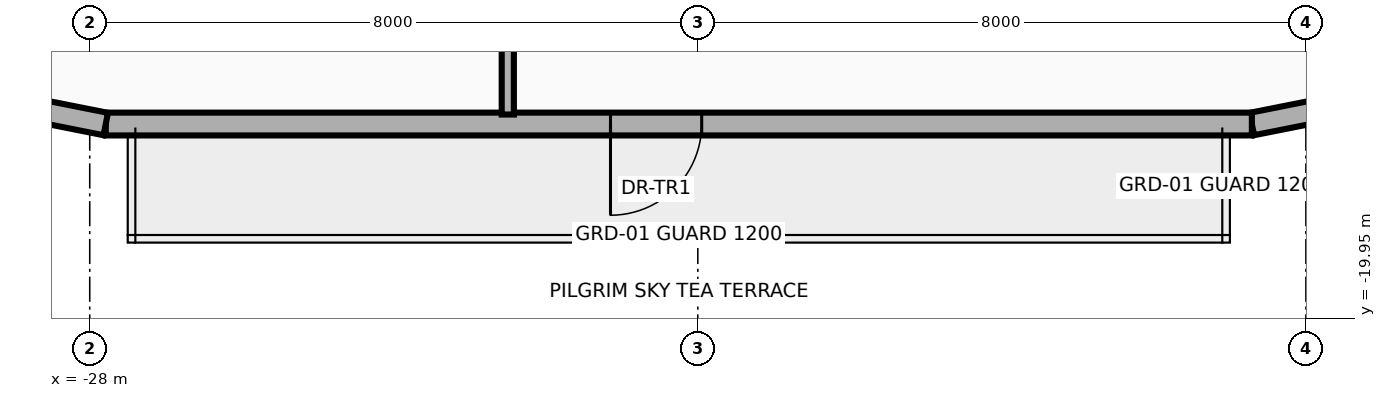
"""IFC4 building model, lengths in metres.
Left out: names, types, materials, properties, quantities, classifications, styles, units other than length and angle.
Written with IfcOpenShell. Run it as: python <this file> out.ifc"""

import sys

from ifc_helpers import new_model, si_unit, direction, frame, frame_2d, origin, place, context, subcontext, project, spatial, rectangle, extrude, element, fill, save


model = new_model("IFC4")
c1 = context("Model", 3, precision=1e-05, world=origin(), true_north=direction((0.0, 1.0)))
c2 = subcontext(c1, "Body", "Model", "MODEL_VIEW")
j1 = project(units=[si_unit("LENGTHUNIT", "METRE"), si_unit("PLANEANGLEUNIT", "RADIAN")], contexts=[c1])
p1 = place(None, origin())
s1 = spatial("IfcSite", under=j1, at=p1, CompositionType="ELEMENT")
p2 = place(p1, origin())
s2 = spatial("IfcBuilding", under=s1, at=p2, CompositionType="ELEMENT")
p3 = place(p2, frame((0.0, 0.0, 101.1)))
s3 = spatial("IfcBuildingStorey", under=s2, at=p3, CompositionType="ELEMENT", Elevation=101.1)
p4 = place(p3, frame((-11.518, -17.153, 0.0), z_axis=(0.0, 0.0, 1.0), x_axis=(-0.980804027463, -0.194996050505, 0.0)))
e1 = element("IfcWall", 1, at=p4, inside=s3, PredefinedType="SOLIDWALL", context=c2, shape_type="SweptSolid", body=[
    extrude(rectangle(XDim=1.216, YDim=0.3, at=frame_2d((0.608, 0.0))), origin(), (0.0, 0.0, 1.0), 4.36),
])
p5 = place(p3, frame((-12.711, -17.39, 0.0), z_axis=(0.0, 0.0, 1.0), x_axis=(-1.0, 0.0, 0.0)))
e2 = element("IfcWall", 2, at=p5, inside=s3, PredefinedType="SOLIDWALL", context=c2, shape_type="SweptSolid", body=[
    extrude(rectangle(XDim=15.079, YDim=0.3, at=frame_2d((7.539, 0.0))), origin(), (0.0, 0.0, 1.0), 4.36),
])
p6 = place(p5, frame((7.238, 0.0, 0.0)))
e3 = element("IfcOpeningElement", 3, at=p6, cuts=e2, PredefinedType="OPENING", context=c2, shape_type="SweptSolid", body=[
    extrude(rectangle(XDim=1.2, YDim=2.15, at=frame_2d((0.6, 1.075))), frame((0.0, 0.165, 0.0), z_axis=(0.0, -1.0, 0.0), x_axis=(1.0, 0.0, 0.0)), (0.0, 0.0, 1.0), 0.33),
])
p7 = place(p3, frame((-27.789, -17.39, 0.0), z_axis=(0.0, 0.0, 1.0), x_axis=(-0.980804027463, 0.194996050505, 0.0)))
e4 = element("IfcWall", 4, at=p7, inside=s3, PredefinedType="SOLIDWALL", context=c2, shape_type="SweptSolid", body=[
    extrude(rectangle(XDim=1.216, YDim=0.3, at=frame_2d((0.608, 0.0))), origin(), (0.0, 0.0, 1.0), 4.36),
])
p8 = place(p3, frame((-22.5, -17.265, 0.0), z_axis=(0.0, 0.0, 1.0), x_axis=(0.0, 1.0, 0.0)))
e5 = element("IfcWall", 5, at=p8, inside=s3, PredefinedType="PARTITIONING", context=c2, shape_type="SweptSolid", body=[
    extrude(rectangle(XDim=4.345, YDim=0.16, at=frame_2d((2.172, 0.0))), origin(), (0.0, 0.0, 1.0), 3.734),
])
p9 = place(p6, origin())
e6 = element("IfcDoor", 6, at=p9, inside=s3, OperationType="SINGLE_SWING_LEFT", PredefinedType="DOOR", context=c2, shape_type="SweptSolid", body=[
    extrude(rectangle(XDim=1.2, YDim=2.15, at=frame_2d((0.6, 1.075))), frame((0.0, 0.025, 0.0), z_axis=(0.0, -1.0, 0.0), x_axis=(1.0, 0.0, 0.0)), (0.0, 0.0, 1.0), 0.05),
])
fill(e3, e6)
save(model, sys.argv[1])
